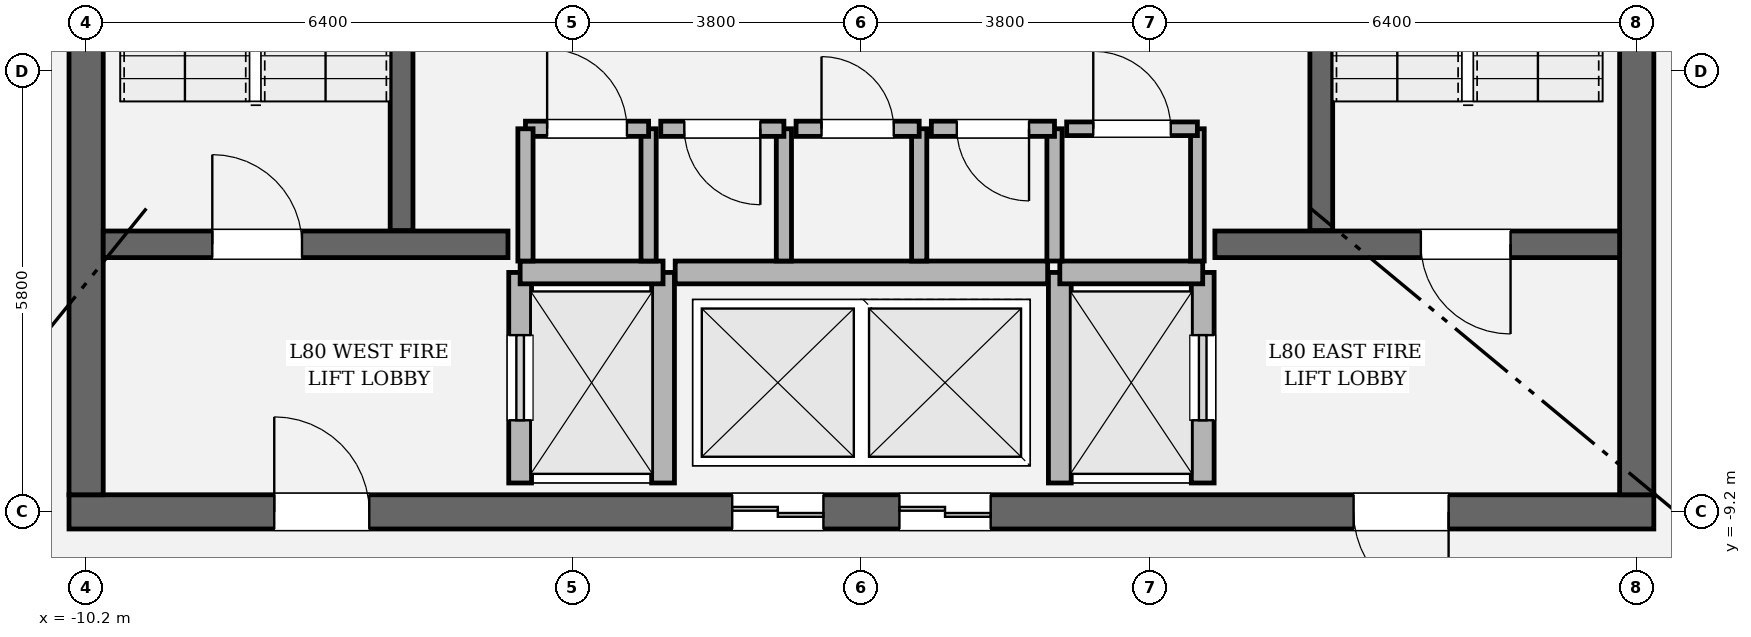
"""IFC4 building model, lengths in metres.
Left out: names, types, materials, properties, quantities, classifications, styles, units other than length and angle.
Written with IfcOpenShell. Run it as: python <this file> out.ifc"""

import sys

from ifc_helpers import new_model, si_unit, direction, frame, frame_2d, origin, place, context, subcontext, project, spatial, rectangle, extrude, element, fill, save


model = new_model("IFC4")
c1 = context("Model", 3, precision=1e-05, world=origin(), true_north=direction((0.0, 1.0)))
c2 = subcontext(c1, "Body", "Model", "MODEL_VIEW")
j1 = project(units=[si_unit("LENGTHUNIT", "METRE"), si_unit("PLANEANGLEUNIT", "RADIAN")], contexts=[c1])
p1 = place(None, origin())
s1 = spatial("IfcSite", under=j1, at=p1, CompositionType="ELEMENT")
p2 = place(p1, origin())
s2 = spatial("IfcBuilding", under=s1, at=p2, CompositionType="ELEMENT")
p3 = place(p2, frame((0.0, 0.0, 339.0)))
s3 = spatial("IfcBuildingStorey", under=s2, at=p3, CompositionType="ELEMENT", Elevation=339.0)
p4 = place(p3, frame((10.425, -9.2, 0.0), z_axis=(0.0, 0.0, 1.0), x_axis=(-1.0, 0.0, 0.0)))
e1 = element("IfcWall", 1, at=p4, inside=s3, PredefinedType="SHEAR", context=c2, shape_type="SweptSolid", body=[
    extrude(rectangle(XDim=20.85, YDim=0.45, at=frame_2d((10.425, 0.0))), origin(), (0.0, 0.0, 1.0), 4.8),
])
p5 = place(p4, frame((2.7, 0.0, 0.0)))
e2 = element("IfcOpeningElement", 2, at=p5, cuts=e1, PredefinedType="OPENING", context=c2, shape_type="SweptSolid", body=[
    extrude(rectangle(XDim=1.25, YDim=2.25, at=frame_2d((0.625, 1.125))), frame((0.0, 0.235, 0.0), z_axis=(0.0, -1.0, 0.0), x_axis=(1.0, 0.0, 0.0)), (0.0, 0.0, 1.0), 0.47),
])
p6 = place(p4, frame((16.9, 0.0, 0.0)))
e3 = element("IfcOpeningElement", 3, at=p6, cuts=e1, PredefinedType="OPENING", context=c2, shape_type="SweptSolid", body=[
    extrude(rectangle(XDim=1.25, YDim=2.25, at=frame_2d((0.625, 1.125))), frame((0.0, 0.235, 0.0), z_axis=(0.0, -1.0, 0.0), x_axis=(1.0, 0.0, 0.0)), (0.0, 0.0, 1.0), 0.47),
])
p7 = place(p4, frame((10.925, 0.0, 0.0)))
e4 = element("IfcOpeningElement", 4, at=p7, cuts=e1, PredefinedType="OPENING", context=c2, shape_type="SweptSolid", body=[
    extrude(rectangle(XDim=1.2, YDim=2.3, at=frame_2d((0.6, 1.15))), frame((0.0, 0.235, 0.0), z_axis=(0.0, -1.0, 0.0), x_axis=(1.0, 0.0, 0.0)), (0.0, 0.0, 1.0), 0.47),
])
p8 = place(p4, frame((8.725, 0.0, 0.0)))
e5 = element("IfcOpeningElement", 5, at=p8, cuts=e1, PredefinedType="OPENING", context=c2, shape_type="SweptSolid", body=[
    extrude(rectangle(XDim=1.2, YDim=2.3, at=frame_2d((0.6, 1.15))), frame((0.0, 0.235, 0.0), z_axis=(0.0, -1.0, 0.0), x_axis=(1.0, 0.0, 0.0)), (0.0, 0.0, 1.0), 0.47),
])
p9 = place(p3, frame((-10.2, -8.975, 0.0), z_axis=(0.0, 0.0, 1.0), x_axis=(0.0, 1.0, 0.0)))
e6 = element("IfcWall", 6, at=p9, inside=s3, PredefinedType="SHEAR", context=c2, shape_type="SweptSolid", body=[
    extrude(rectangle(XDim=17.95, YDim=0.45, at=frame_2d((8.975, 0.0))), origin(), (0.0, 0.0, 1.0), 4.8),
])
p10 = place(p9, frame((12.765, 0.0, 0.0)))
e7 = element("IfcOpeningElement", 7, at=p10, cuts=e6, PredefinedType="OPENING", context=c2, shape_type="SweptSolid", body=[
    extrude(rectangle(XDim=1.18, YDim=2.2, at=frame_2d((0.59, 1.1))), frame((0.0, 0.235, 0.0), z_axis=(0.0, -1.0, 0.0), x_axis=(1.0, 0.0, 0.0)), (0.0, 0.0, 1.0), 0.47),
])
p11 = place(p3, frame((10.2, 8.975, 0.0), z_axis=(0.0, 0.0, 1.0), x_axis=(0.0, -1.0, 0.0)))
e8 = element("IfcWall", 8, at=p11, inside=s3, PredefinedType="SHEAR", context=c2, shape_type="SweptSolid", body=[
    extrude(rectangle(XDim=17.95, YDim=0.45, at=frame_2d((8.975, 0.0))), origin(), (0.0, 0.0, 1.0), 4.8),
])
p12 = place(p11, frame((4.005, 0.0, 0.0)))
e9 = element("IfcOpeningElement", 9, at=p12, cuts=e8, PredefinedType="OPENING", context=c2, shape_type="SweptSolid", body=[
    extrude(rectangle(XDim=1.18, YDim=2.2, at=frame_2d((0.59, 1.1))), frame((0.0, 0.235, 0.0), z_axis=(0.0, -1.0, 0.0), x_axis=(1.0, 0.0, 0.0)), (0.0, 0.0, 1.0), 0.47),
])
for number, where, z_axis, x_axis in (
    (10, (-6.05, -5.5, 0.0), (0.0, 0.0, 1.0), (0.0, 1.0, 0.0)),
    (11, (6.05, 3.45, 0.0), (0.0, 0.0, 1.0), (0.0, -1.0, 0.0)),
):
    element("IfcWall", number, at=place(p3, frame(where, z_axis=z_axis, x_axis=x_axis)), inside=s3, PredefinedType="SOLIDWALL", context=c2, shape_type="SweptSolid", body=[
        extrude(rectangle(XDim=8.95, YDim=0.3, at=frame_2d((4.475, 0.0))), origin(), (0.0, 0.0, 1.0), 4.8),
    ])
p13 = place(p3, frame((-9.975, -5.68, 0.0), z_axis=(0.0, 0.0, 1.0), x_axis=(1.0, 0.0, 0.0)))
e12 = element("IfcWall", 12, at=p13, inside=s3, PredefinedType="SOLIDWALL", context=c2, shape_type="SweptSolid", body=[
    extrude(rectangle(XDim=5.325, YDim=0.35, at=frame_2d((2.663, 0.0))), origin(), (0.0, 0.0, 1.0), 4.8),
])
p14 = place(p13, frame((1.435, 0.0, 0.0)))
e13 = element("IfcOpeningElement", 13, at=p14, cuts=e12, PredefinedType="OPENING", context=c2, shape_type="SweptSolid", body=[
    extrude(rectangle(XDim=1.18, YDim=2.2, at=frame_2d((0.59, 1.1))), frame((0.0, 0.185, 0.0), z_axis=(0.0, -1.0, 0.0), x_axis=(1.0, 0.0, 0.0)), (0.0, 0.0, 1.0), 0.37),
])
p15 = place(p3, frame((4.65, -5.68, 0.0), z_axis=(0.0, 0.0, 1.0), x_axis=(1.0, 0.0, 0.0)))
e14 = element("IfcWall", 14, at=p15, inside=s3, PredefinedType="SOLIDWALL", context=c2, shape_type="SweptSolid", body=[
    extrude(rectangle(XDim=5.325, YDim=0.35, at=frame_2d((2.663, 0.0))), origin(), (0.0, 0.0, 1.0), 4.8),
])
p16 = place(p15, frame((2.71, 0.0, 0.0)))
e15 = element("IfcOpeningElement", 15, at=p16, cuts=e14, PredefinedType="OPENING", context=c2, shape_type="SweptSolid", body=[
    extrude(rectangle(XDim=1.18, YDim=2.2, at=frame_2d((0.59, 1.1))), frame((0.0, 0.185, 0.0), z_axis=(0.0, -1.0, 0.0), x_axis=(1.0, 0.0, 0.0)), (0.0, 0.0, 1.0), 0.37),
])
p17 = place(p3, frame((-4.49, -8.82, 0.0), z_axis=(0.0, 0.0, 1.0), x_axis=(0.0, 1.0, 0.0)))
e16 = element("IfcWall", 16, at=p17, inside=s3, PredefinedType="SOLIDWALL", context=c2, shape_type="SweptSolid", body=[
    extrude(rectangle(XDim=2.77, YDim=0.3, at=frame_2d((1.385, 0.0))), origin(), (0.0, 0.0, 1.0), 4.52),
])
p18 = place(p17, frame((0.825, 0.0, 0.0)))
e17 = element("IfcOpeningElement", 17, at=p18, cuts=e16, PredefinedType="OPENING", context=c2, shape_type="SweptSolid", body=[
    extrude(rectangle(XDim=1.12, YDim=2.25, at=frame_2d((0.56, 1.125))), frame((0.0, 0.16, 0.0), z_axis=(0.0, -1.0, 0.0), x_axis=(1.0, 0.0, 0.0)), (0.0, 0.0, 1.0), 0.32),
])
p19 = place(p3, frame((-2.61, -8.82, 0.0), z_axis=(0.0, 0.0, 1.0), x_axis=(0.0, 1.0, 0.0)))
e18 = element("IfcWall", 18, at=p19, inside=s3, PredefinedType="SOLIDWALL", context=c2, shape_type="SweptSolid", body=[
    extrude(rectangle(XDim=2.77, YDim=0.3, at=frame_2d((1.385, 0.0))), origin(), (0.0, 0.0, 1.0), 4.52),
])
p20 = place(p3, frame((-4.49, -6.05, 0.0), z_axis=(0.0, 0.0, 1.0), x_axis=(1.0, 0.0, 0.0)))
e19 = element("IfcWall", 19, at=p20, inside=s3, PredefinedType="SOLIDWALL", context=c2, shape_type="SweptSolid", body=[
    extrude(rectangle(XDim=1.88, YDim=0.3, at=frame_2d((0.94, 0.0))), origin(), (0.0, 0.0, 1.0), 4.52),
])
p21 = place(p3, frame((4.49, -8.82, 0.0), z_axis=(0.0, 0.0, 1.0), x_axis=(0.0, 1.0, 0.0)))
e20 = element("IfcWall", 20, at=p21, inside=s3, PredefinedType="SOLIDWALL", context=c2, shape_type="SweptSolid", body=[
    extrude(rectangle(XDim=2.77, YDim=0.3, at=frame_2d((1.385, 0.0))), origin(), (0.0, 0.0, 1.0), 4.52),
])
p22 = place(p21, frame((0.825, 0.0, 0.0)))
e21 = element("IfcOpeningElement", 21, at=p22, cuts=e20, PredefinedType="OPENING", context=c2, shape_type="SweptSolid", body=[
    extrude(rectangle(XDim=1.12, YDim=2.25, at=frame_2d((0.56, 1.125))), frame((0.0, 0.16, 0.0), z_axis=(0.0, -1.0, 0.0), x_axis=(1.0, 0.0, 0.0)), (0.0, 0.0, 1.0), 0.32),
])
p23 = place(p3, frame((2.61, -8.82, 0.0), z_axis=(0.0, 0.0, 1.0), x_axis=(0.0, 1.0, 0.0)))
e22 = element("IfcWall", 22, at=p23, inside=s3, PredefinedType="SOLIDWALL", context=c2, shape_type="SweptSolid", body=[
    extrude(rectangle(XDim=2.77, YDim=0.3, at=frame_2d((1.385, 0.0))), origin(), (0.0, 0.0, 1.0), 4.52),
])
p24 = place(p3, frame((2.61, -6.05, 0.0), z_axis=(0.0, 0.0, 1.0), x_axis=(1.0, 0.0, 0.0)))
e23 = element("IfcWall", 23, at=p24, inside=s3, PredefinedType="SOLIDWALL", context=c2, shape_type="SweptSolid", body=[
    extrude(rectangle(XDim=1.88, YDim=0.3, at=frame_2d((0.94, 0.0))), origin(), (0.0, 0.0, 1.0), 4.52),
])
p25 = place(p3, frame((-2.45, -6.05, 0.0), z_axis=(0.0, 0.0, 1.0), x_axis=(1.0, 0.0, 0.0)))
e24 = element("IfcWall", 24, at=p25, inside=s3, PredefinedType="SOLIDWALL", context=c2, shape_type="SweptSolid", body=[
    extrude(rectangle(XDim=4.9, YDim=0.3, at=frame_2d((2.45, 0.0))), origin(), (0.0, 0.0, 1.0), 4.52),
])
p26 = place(p3, frame((-2.8, -5.9, 0.0), z_axis=(0.0, 0.0, 1.0), x_axis=(0.0, 1.0, 0.0)))
e25 = element("IfcWall", 25, at=p26, inside=s3, PredefinedType="SOLIDWALL", context=c2, shape_type="SweptSolid", body=[
    extrude(rectangle(XDim=1.74, YDim=0.2, at=frame_2d((0.87, 0.0))), origin(), (0.0, 0.0, 1.0), 4.52),
])
p27 = place(p3, frame((-2.8, -4.16, 0.0), z_axis=(0.0, 0.0, 1.0), x_axis=(-1.0, 0.0, 0.0)))
e26 = element("IfcWall", 26, at=p27, inside=s3, PredefinedType="SOLIDWALL", context=c2, shape_type="SweptSolid", body=[
    extrude(rectangle(XDim=1.62, YDim=0.2, at=frame_2d((0.81, 0.0))), origin(), (0.0, 0.0, 1.0), 4.52),
])
p28 = place(p27, frame((0.285, 0.0, 0.0)))
e27 = element("IfcOpeningElement", 27, at=p28, cuts=e26, PredefinedType="OPENING", context=c2, shape_type="SweptSolid", body=[
    extrude(rectangle(XDim=1.05, YDim=2.2, at=frame_2d((0.525, 1.1))), frame((0.0, 0.11, 0.0), z_axis=(0.0, -1.0, 0.0), x_axis=(1.0, 0.0, 0.0)), (0.0, 0.0, 1.0), 0.22),
])
for number, where, z_axis, x_axis in (
    (28, (-4.42, -4.16, 0.0), (0.0, 0.0, 1.0), (0.0, -1.0, 0.0)),
    (29, (-1.02, -5.9, 0.0), (0.0, 0.0, 1.0), (0.0, 1.0, 0.0)),
):
    element("IfcWall", number, at=place(p3, frame(where, z_axis=z_axis, x_axis=x_axis)), inside=s3, PredefinedType="SOLIDWALL", context=c2, shape_type="SweptSolid", body=[
        extrude(rectangle(XDim=1.74, YDim=0.2, at=frame_2d((0.87, 0.0))), origin(), (0.0, 0.0, 1.0), 4.52),
    ])
p29 = place(p3, frame((-1.02, -4.16, 0.0), z_axis=(0.0, 0.0, 1.0), x_axis=(-1.0, 0.0, 0.0)))
e30 = element("IfcWall", 30, at=p29, inside=s3, PredefinedType="SOLIDWALL", context=c2, shape_type="SweptSolid", body=[
    extrude(rectangle(XDim=1.62, YDim=0.2, at=frame_2d((0.81, 0.0))), origin(), (0.0, 0.0, 1.0), 4.52),
])
p30 = place(p29, frame((0.31, 0.0, 0.0)))
e31 = element("IfcOpeningElement", 31, at=p30, cuts=e30, PredefinedType="OPENING", context=c2, shape_type="SweptSolid", body=[
    extrude(rectangle(XDim=1.0, YDim=2.15, at=frame_2d((0.5, 1.075))), frame((0.0, 0.11, 0.0), z_axis=(0.0, -1.0, 0.0), x_axis=(1.0, 0.0, 0.0)), (0.0, 0.0, 1.0), 0.22),
])
p31 = place(p3, frame((0.76, -5.9, 0.0), z_axis=(0.0, 0.0, 1.0), x_axis=(0.0, 1.0, 0.0)))
e32 = element("IfcWall", 32, at=p31, inside=s3, PredefinedType="SOLIDWALL", context=c2, shape_type="SweptSolid", body=[
    extrude(rectangle(XDim=1.74, YDim=0.2, at=frame_2d((0.87, 0.0))), origin(), (0.0, 0.0, 1.0), 4.52),
])
p32 = place(p3, frame((0.76, -4.16, 0.0), z_axis=(0.0, 0.0, 1.0), x_axis=(-1.0, 0.0, 0.0)))
e33 = element("IfcWall", 33, at=p32, inside=s3, PredefinedType="SOLIDWALL", context=c2, shape_type="SweptSolid", body=[
    extrude(rectangle(XDim=1.62, YDim=0.2, at=frame_2d((0.81, 0.0))), origin(), (0.0, 0.0, 1.0), 4.52),
])
p33 = place(p32, frame((0.335, 0.0, 0.0)))
e34 = element("IfcOpeningElement", 34, at=p33, cuts=e33, PredefinedType="OPENING", context=c2, shape_type="SweptSolid", body=[
    extrude(rectangle(XDim=0.95, YDim=2.15, at=frame_2d((0.475, 1.075))), frame((0.0, 0.11, 0.0), z_axis=(0.0, -1.0, 0.0), x_axis=(1.0, 0.0, 0.0)), (0.0, 0.0, 1.0), 0.22),
])
p34 = place(p3, frame((2.54, -5.9, 0.0), z_axis=(0.0, 0.0, 1.0), x_axis=(0.0, 1.0, 0.0)))
e35 = element("IfcWall", 35, at=p34, inside=s3, PredefinedType="SOLIDWALL", context=c2, shape_type="SweptSolid", body=[
    extrude(rectangle(XDim=1.74, YDim=0.2, at=frame_2d((0.87, 0.0))), origin(), (0.0, 0.0, 1.0), 4.52),
])
p35 = place(p3, frame((2.54, -4.16, 0.0), z_axis=(0.0, 0.0, 1.0), x_axis=(-1.0, 0.0, 0.0)))
e36 = element("IfcWall", 36, at=p35, inside=s3, PredefinedType="SOLIDWALL", context=c2, shape_type="SweptSolid", body=[
    extrude(rectangle(XDim=1.62, YDim=0.2, at=frame_2d((0.81, 0.0))), origin(), (0.0, 0.0, 1.0), 4.52),
])
p36 = place(p35, frame((0.335, 0.0, 0.0)))
e37 = element("IfcOpeningElement", 37, at=p36, cuts=e36, PredefinedType="OPENING", context=c2, shape_type="SweptSolid", body=[
    extrude(rectangle(XDim=0.95, YDim=2.15, at=frame_2d((0.475, 1.075))), frame((0.0, 0.11, 0.0), z_axis=(0.0, -1.0, 0.0), x_axis=(1.0, 0.0, 0.0)), (0.0, 0.0, 1.0), 0.22),
])
p37 = place(p3, frame((4.42, -5.9, 0.0), z_axis=(0.0, 0.0, 1.0), x_axis=(0.0, 1.0, 0.0)))
e38 = element("IfcWall", 38, at=p37, inside=s3, PredefinedType="PARTITIONING", context=c2, shape_type="SweptSolid", body=[
    extrude(rectangle(XDim=1.74, YDim=0.18, at=frame_2d((0.87, 0.0))), origin(), (0.0, 0.0, 1.0), 4.52),
])
p38 = place(p3, frame((4.42, -4.16, 0.0), z_axis=(0.0, 0.0, 1.0), x_axis=(-1.0, 0.0, 0.0)))
e39 = element("IfcWall", 39, at=p38, inside=s3, PredefinedType="PARTITIONING", context=c2, shape_type="SweptSolid", body=[
    extrude(rectangle(XDim=1.72, YDim=0.18, at=frame_2d((0.86, 0.0))), origin(), (0.0, 0.0, 1.0), 4.52),
])
p39 = place(p38, frame((0.35, 0.0, 0.0)))
e40 = element("IfcOpeningElement", 40, at=p39, cuts=e39, PredefinedType="OPENING", context=c2, shape_type="SweptSolid", body=[
    extrude(rectangle(XDim=1.02, YDim=2.2, at=frame_2d((0.51, 1.1))), frame((0.0, 0.1, 0.0), z_axis=(0.0, -1.0, 0.0), x_axis=(1.0, 0.0, 0.0)), (0.0, 0.0, 1.0), 0.2),
])
p40 = place(p14, origin())
e41 = element("IfcDoor", 41, at=p40, inside=s3, OperationType="SINGLE_SWING_LEFT", PredefinedType="DOOR", context=c2, shape_type="SweptSolid", body=[
    extrude(rectangle(XDim=1.18, YDim=2.2, at=frame_2d((0.59, 1.1))), frame((0.0, 0.025, 0.0), z_axis=(0.0, -1.0, 0.0), x_axis=(1.0, 0.0, 0.0)), (0.0, 0.0, 1.0), 0.05),
])
fill(e13, e41)
p41 = place(p16, origin())
e42 = element("IfcDoor", 42, at=p41, inside=s3, OperationType="SINGLE_SWING_RIGHT", PredefinedType="DOOR", context=c2, shape_type="SweptSolid", body=[
    extrude(rectangle(XDim=1.18, YDim=2.2, at=frame_2d((0.59, 1.1))), frame((0.0, 0.025, 0.0), z_axis=(0.0, -1.0, 0.0), x_axis=(1.0, 0.0, 0.0)), (0.0, 0.0, 1.0), 0.05),
])
fill(e15, e42)
p42 = place(p5, origin())
e43 = element("IfcDoor", 43, at=p42, inside=s3, OperationType="SINGLE_SWING_LEFT", PredefinedType="DOOR", context=c2, shape_type="SweptSolid", body=[
    extrude(rectangle(XDim=1.25, YDim=2.25, at=frame_2d((0.625, 1.125))), frame((0.0, 0.025, 0.0), z_axis=(0.0, -1.0, 0.0), x_axis=(1.0, 0.0, 0.0)), (0.0, 0.0, 1.0), 0.05),
])
fill(e2, e43)
p43 = place(p6, origin())
e44 = element("IfcDoor", 44, at=p43, inside=s3, OperationType="SINGLE_SWING_RIGHT", PredefinedType="DOOR", context=c2, shape_type="SweptSolid", body=[
    extrude(rectangle(XDim=1.25, YDim=2.25, at=frame_2d((0.625, 1.125))), frame((0.0, 0.025, 0.0), z_axis=(0.0, -1.0, 0.0), x_axis=(1.0, 0.0, 0.0)), (0.0, 0.0, 1.0), 0.05),
])
fill(e3, e44)
p44 = place(p18, origin())
e45 = element("IfcDoor", 45, at=p44, inside=s3, OperationType="SLIDING_TO_LEFT", PredefinedType="DOOR", context=c2, shape_type="SweptSolid", body=[
    extrude(rectangle(XDim=1.12, YDim=2.25, at=frame_2d((0.56, 1.125))), frame((0.0, 0.025, 0.0), z_axis=(0.0, -1.0, 0.0), x_axis=(1.0, 0.0, 0.0)), (0.0, 0.0, 1.0), 0.05),
])
fill(e17, e45)
p45 = place(p22, origin())
e46 = element("IfcDoor", 46, at=p45, inside=s3, OperationType="SLIDING_TO_RIGHT", PredefinedType="DOOR", context=c2, shape_type="SweptSolid", body=[
    extrude(rectangle(XDim=1.12, YDim=2.25, at=frame_2d((0.56, 1.125))), frame((0.0, 0.025, 0.0), z_axis=(0.0, -1.0, 0.0), x_axis=(1.0, 0.0, 0.0)), (0.0, 0.0, 1.0), 0.05),
])
fill(e21, e46)
p46 = place(p7, origin())
e47 = element("IfcDoor", 47, at=p46, inside=s3, OperationType="DOUBLE_DOOR_SLIDING", PredefinedType="DOOR", context=c2, shape_type="SweptSolid", body=[
    extrude(rectangle(XDim=1.2, YDim=2.3, at=frame_2d((0.6, 1.15))), frame((0.0, 0.025, 0.0), z_axis=(0.0, -1.0, 0.0), x_axis=(1.0, 0.0, 0.0)), (0.0, 0.0, 1.0), 0.05),
])
fill(e4, e47)
p47 = place(p8, origin())
e48 = element("IfcDoor", 48, at=p47, inside=s3, OperationType="DOUBLE_DOOR_SLIDING", PredefinedType="DOOR", context=c2, shape_type="SweptSolid", body=[
    extrude(rectangle(XDim=1.2, YDim=2.3, at=frame_2d((0.6, 1.15))), frame((0.0, 0.025, 0.0), z_axis=(0.0, -1.0, 0.0), x_axis=(1.0, 0.0, 0.0)), (0.0, 0.0, 1.0), 0.05),
])
fill(e5, e48)
p48 = place(p28, origin())
e49 = element("IfcDoor", 49, at=p48, inside=s3, OperationType="SINGLE_SWING_RIGHT", PredefinedType="DOOR", context=c2, shape_type="SweptSolid", body=[
    extrude(rectangle(XDim=1.05, YDim=2.2, at=frame_2d((0.525, 1.1))), frame((0.0, 0.025, 0.0), z_axis=(0.0, -1.0, 0.0), x_axis=(1.0, 0.0, 0.0)), (0.0, 0.0, 1.0), 0.05),
])
fill(e27, e49)
p49 = place(p30, origin())
e50 = element("IfcDoor", 50, at=p49, inside=s3, OperationType="SINGLE_SWING_LEFT", PredefinedType="DOOR", context=c2, shape_type="SweptSolid", body=[
    extrude(rectangle(XDim=1.0, YDim=2.15, at=frame_2d((0.5, 1.075))), frame((0.0, 0.025, 0.0), z_axis=(0.0, -1.0, 0.0), x_axis=(1.0, 0.0, 0.0)), (0.0, 0.0, 1.0), 0.05),
])
fill(e31, e50)
p50 = place(p33, origin())
e51 = element("IfcDoor", 51, at=p50, inside=s3, OperationType="SINGLE_SWING_RIGHT", PredefinedType="DOOR", context=c2, shape_type="SweptSolid", body=[
    extrude(rectangle(XDim=0.95, YDim=2.15, at=frame_2d((0.475, 1.075))), frame((0.0, 0.025, 0.0), z_axis=(0.0, -1.0, 0.0), x_axis=(1.0, 0.0, 0.0)), (0.0, 0.0, 1.0), 0.05),
])
fill(e34, e51)
p51 = place(p36, origin())
e52 = element("IfcDoor", 52, at=p51, inside=s3, OperationType="SINGLE_SWING_LEFT", PredefinedType="DOOR", context=c2, shape_type="SweptSolid", body=[
    extrude(rectangle(XDim=0.95, YDim=2.15, at=frame_2d((0.475, 1.075))), frame((0.0, 0.025, 0.0), z_axis=(0.0, -1.0, 0.0), x_axis=(1.0, 0.0, 0.0)), (0.0, 0.0, 1.0), 0.05),
])
fill(e37, e52)
p52 = place(p39, origin())
e53 = element("IfcDoor", 53, at=p52, inside=s3, OperationType="SINGLE_SWING_RIGHT", PredefinedType="DOOR", context=c2, shape_type="SweptSolid", body=[
    extrude(rectangle(XDim=1.02, YDim=2.2, at=frame_2d((0.51, 1.1))), frame((0.0, 0.025, 0.0), z_axis=(0.0, -1.0, 0.0), x_axis=(1.0, 0.0, 0.0)), (0.0, 0.0, 1.0), 0.05),
])
fill(e40, e53)
save(model, sys.argv[1])
